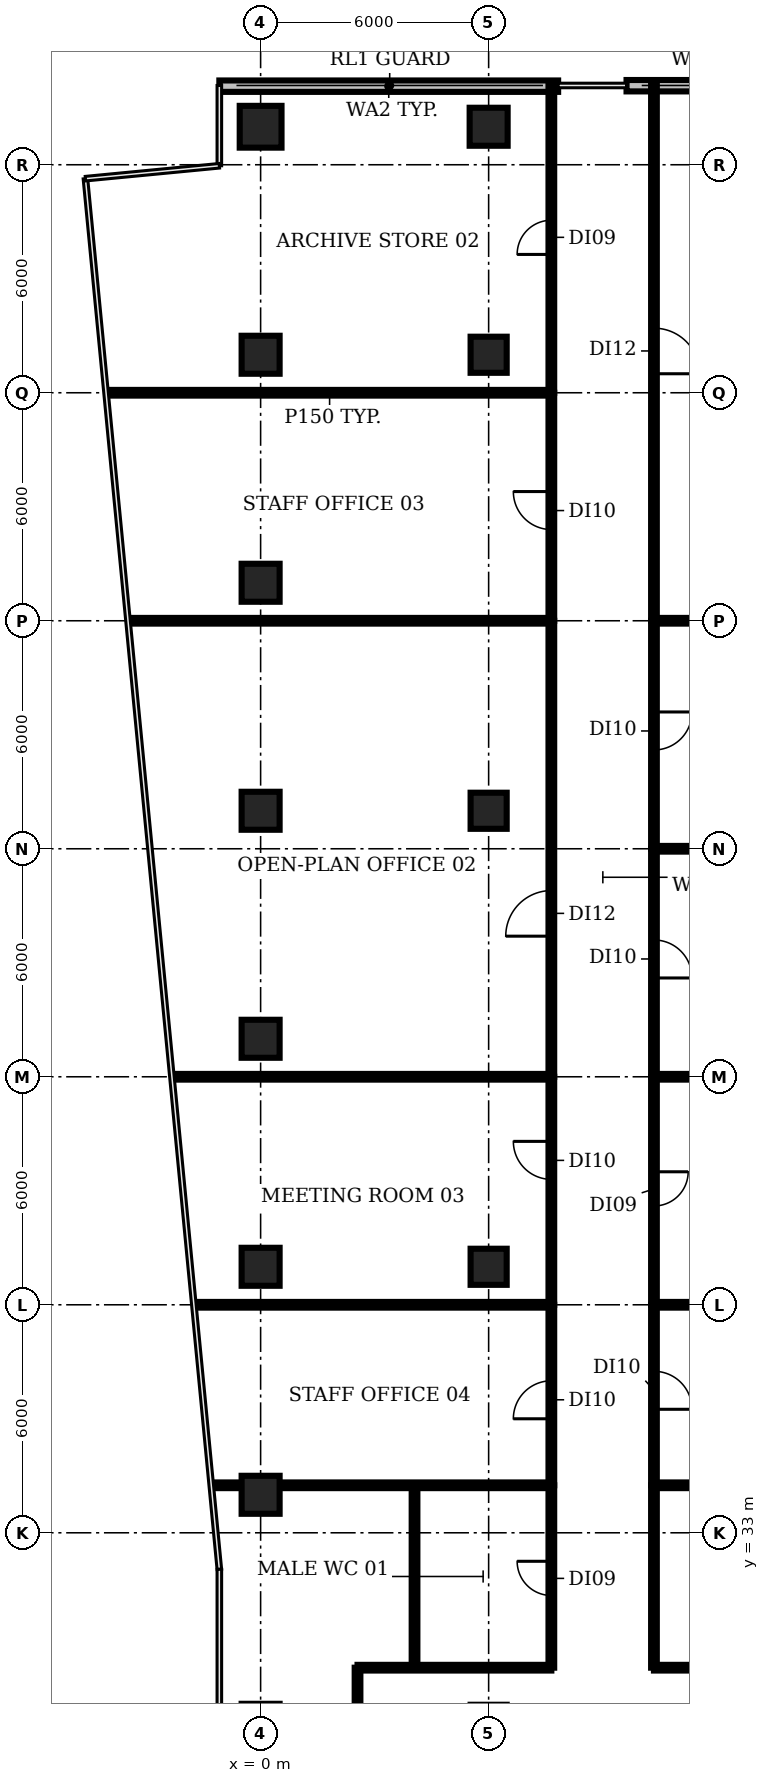
"""IFC4 building model, lengths in metres.
Left out: names, types, materials, properties, quantities, classifications, styles, units other than length and angle.
Written with IfcOpenShell. Run it as: python <this file> out.ifc"""

import sys

from ifc_helpers import new_model, si_unit, direction, frame, frame_2d, origin, origin_2d, place, context, subcontext, project, spatial, rectangle, circle, extrude, element, fill, save


model = new_model("IFC4")
c1 = context("Model", 3, precision=1e-05, world=origin(), true_north=direction((0.0, 1.0)))
c2 = subcontext(c1, "Body", "Model", "MODEL_VIEW")
j1 = project(units=[si_unit("LENGTHUNIT", "METRE"), si_unit("PLANEANGLEUNIT", "RADIAN")], contexts=[c1])
p1 = place(None, origin())
s1 = spatial("IfcSite", under=j1, at=p1, CompositionType="ELEMENT")
p2 = place(p1, origin())
s2 = spatial("IfcBuilding", under=s1, at=p2, CompositionType="ELEMENT")
p3 = place(p2, frame((0.0, 0.0, 87.8)))
s3 = spatial("IfcBuildingStorey", under=s2, at=p3, CompositionType="ELEMENT", Elevation=87.8)
for number, where, z_axis, x_axis in (
    (1, (0.0, 34.0, -0.35), (0.0, 0.0, 1.0), (1.0, 0.0, 0.0)),
    (2, (0.0, 40.0, -0.35), (0.0, 0.0, 1.0), (1.0, 0.0, 0.0)),
    (3, (0.0, 46.0, -0.35), (0.0, 0.0, 1.0), (1.0, 0.0, 0.0)),
    (4, (0.0, 52.0, -0.35), (0.0, 0.0, 1.0), (1.0, 0.0, 0.0)),
    (5, (0.0, 58.0, -0.35), (0.0, 0.0, 1.0), (1.0, 0.0, 0.0)),
    (6, (0.0, 64.0, -0.35), (0.0, 0.0, 1.0), (1.0, 0.0, 0.0)),
):
    element("IfcColumn", number, at=place(p3, frame(where, z_axis=z_axis, x_axis=x_axis)), inside=s3, PredefinedType="COLUMN", context=c2, shape_type="SweptSolid", body=[
        extrude(rectangle(XDim=1.0, YDim=1.0, at=origin_2d()), origin(), (0.0, 0.0, 1.0), 4.2),
    ])
p4 = place(p3, frame((0.0, 70.0, -0.35), z_axis=(0.0, 0.0, 1.0), x_axis=(1.0, 0.0, 0.0)))
e7 = element("IfcColumn", 7, at=p4, inside=s3, PredefinedType="COLUMN", context=c2, shape_type="SweptSolid", body=[
    extrude(circle(Radius=0.55, at=origin_2d()), origin(), (0.0, 0.0, 1.0), 4.2),
])
for number, where, z_axis, x_axis in (
    (8, (6.0, 40.0, -0.35), (0.0, 0.0, 1.0), (1.0, 0.0, 0.0)),
    (9, (6.0, 52.0, -0.35), (0.0, 0.0, 1.0), (1.0, 0.0, 0.0)),
    (10, (6.0, 64.0, -0.35), (0.0, 0.0, 1.0), (1.0, 0.0, 0.0)),
):
    element("IfcColumn", number, at=place(p3, frame(where, z_axis=z_axis, x_axis=x_axis)), inside=s3, PredefinedType="COLUMN", context=c2, shape_type="SweptSolid", body=[
        extrude(rectangle(XDim=0.95, YDim=0.95, at=origin_2d()), origin(), (0.0, 0.0, 1.0), 4.2),
    ])
p5 = place(p3, frame((6.0, 70.0, -0.35), z_axis=(0.0, 0.0, 1.0), x_axis=(1.0, 0.0, 0.0)))
e11 = element("IfcColumn", 11, at=p5, inside=s3, PredefinedType="COLUMN", context=c2, shape_type="SweptSolid", body=[
    extrude(rectangle(XDim=1.0, YDim=1.0, at=origin_2d()), origin(), (0.0, 0.0, 1.0), 4.2),
])
p6 = place(p3, frame((14.372, 71.08, 0.0), z_axis=(0.0, 0.0, 1.0), x_axis=(-1.0, 0.0, 0.0)))
e12 = element("IfcWall", 12, at=p6, inside=s3, PredefinedType="SOLIDWALL", context=c2, shape_type="SweptSolid", body=[
    extrude(rectangle(XDim=4.743, YDim=0.3, at=frame_2d((2.372, 0.0))), origin(), (0.0, 0.0, 1.0), 3.85),
])
p7 = place(p3, frame((7.829, 71.068, 0.0), z_axis=(0.0, 0.0, 1.0), x_axis=(-1.0, 0.0, 0.0)))
e13 = element("IfcWall", 13, at=p7, inside=s3, PredefinedType="SOLIDWALL", context=c2, shape_type="SweptSolid", body=[
    extrude(rectangle(XDim=8.915, YDim=0.3, at=frame_2d((4.457, 0.0))), origin(), (0.0, 0.0, 1.0), 3.85),
])
p8 = place(p3, frame((-4.02, 63.0, 0.0), z_axis=(0.0, 0.0, 1.0), x_axis=(1.0, 0.0, 0.0)))
e14 = element("IfcWall", 14, at=p8, inside=s3, PredefinedType="PARTITIONING", context=c2, shape_type="SweptSolid", body=[
    extrude(rectangle(XDim=11.67, YDim=0.15, at=frame_2d((5.835, 0.0))), origin(), (0.0, 0.0, 1.0), 2.83),
])
p9 = place(p3, frame((-3.44, 57.0, 0.0), z_axis=(0.0, 0.0, 1.0), x_axis=(1.0, 0.0, 0.0)))
e15 = element("IfcWall", 15, at=p9, inside=s3, PredefinedType="PARTITIONING", context=c2, shape_type="SweptSolid", body=[
    extrude(rectangle(XDim=11.09, YDim=0.15, at=frame_2d((5.545, 0.0))), origin(), (0.0, 0.0, 1.0), 2.83),
])
p10 = place(p3, frame((-2.28, 45.0, 0.0), z_axis=(0.0, 0.0, 1.0), x_axis=(1.0, 0.0, 0.0)))
e16 = element("IfcWall", 16, at=p10, inside=s3, PredefinedType="PARTITIONING", context=c2, shape_type="SweptSolid", body=[
    extrude(rectangle(XDim=9.93, YDim=0.15, at=frame_2d((4.965, 0.0))), origin(), (0.0, 0.0, 1.0), 2.83),
])
p11 = place(p3, frame((-1.71, 39.0, 0.0), z_axis=(0.0, 0.0, 1.0), x_axis=(1.0, 0.0, 0.0)))
e17 = element("IfcWall", 17, at=p11, inside=s3, PredefinedType="PARTITIONING", context=c2, shape_type="SweptSolid", body=[
    extrude(rectangle(XDim=9.36, YDim=0.15, at=frame_2d((4.68, 0.0))), origin(), (0.0, 0.0, 1.0), 2.83),
])
p12 = place(p3, frame((-1.25, 34.25, 0.0), z_axis=(0.0, 0.0, 1.0), x_axis=(1.0, 0.0, 0.0)))
e18 = element("IfcWall", 18, at=p12, inside=s3, PredefinedType="PARTITIONING", context=c2, shape_type="SweptSolid", body=[
    extrude(rectangle(XDim=8.9, YDim=0.15, at=frame_2d((4.45, 0.0))), origin(), (0.0, 0.0, 1.0), 2.83),
])
p13 = place(p3, frame((2.55, 25.55, 0.0), z_axis=(0.0, 0.0, 1.0), x_axis=(0.0, 1.0, 0.0)))
e19 = element("IfcWall", 19, at=p13, inside=s3, PredefinedType="PARTITIONING", context=c2, shape_type="SweptSolid", body=[
    extrude(rectangle(XDim=3.9, YDim=0.15, at=frame_2d((1.95, 0.0))), origin(), (0.0, 0.0, 1.0), 2.83),
])
p14 = place(p3, frame((2.55, 29.45, 0.0), z_axis=(0.0, 0.0, 1.0), x_axis=(1.0, 0.0, 0.0)))
e20 = element("IfcWall", 20, at=p14, inside=s3, PredefinedType="PARTITIONING", context=c2, shape_type="SweptSolid", body=[
    extrude(rectangle(XDim=5.1, YDim=0.15, at=frame_2d((2.55, 0.0))), origin(), (0.0, 0.0, 1.0), 2.83),
])
p15 = place(p3, frame((4.05, 29.45, 0.0), z_axis=(0.0, 0.0, 1.0), x_axis=(0.0, 1.0, 0.0)))
e21 = element("IfcWall", 21, at=p15, inside=s3, PredefinedType="PARTITIONING", context=c2, shape_type="SweptSolid", body=[
    extrude(rectangle(XDim=4.8, YDim=0.15, at=frame_2d((2.4, 0.0))), origin(), (0.0, 0.0, 1.0), 2.83),
])
p16 = place(p3, frame((7.65, 29.45, 0.0), z_axis=(0.0, 0.0, 1.0), x_axis=(0.0, 1.0, 0.0)))
e22 = element("IfcWall", 22, at=p16, inside=s3, PredefinedType="PARTITIONING", context=c2, shape_type="SweptSolid", body=[
    extrude(rectangle(XDim=4.8, YDim=0.15, at=frame_2d((2.4, 0.0))), origin(), (0.0, 0.0, 1.0), 2.83),
])
p17 = place(p16, frame((1.9, 0.0, 0.0)))
e23 = element("IfcOpeningElement", 23, at=p17, cuts=e22, PredefinedType="OPENING", context=c2, shape_type="SweptSolid", body=[
    extrude(rectangle(XDim=0.9, YDim=2.1, at=frame_2d((0.45, 1.05))), frame((0.0, 0.085, 0.0), z_axis=(0.0, -1.0, 0.0), x_axis=(1.0, 0.0, 0.0)), (0.0, 0.0, 1.0), 0.17),
])
p18 = place(p3, frame((7.65, 34.25, 0.0), z_axis=(0.0, 0.0, 1.0), x_axis=(0.0, 1.0, 0.0)))
e24 = element("IfcWall", 24, at=p18, inside=s3, PredefinedType="PARTITIONING", context=c2, shape_type="SweptSolid", body=[
    extrude(rectangle(XDim=4.75, YDim=0.15, at=frame_2d((2.375, 0.0))), origin(), (0.0, 0.0, 1.0), 2.83),
])
p19 = place(p18, frame((1.75, 0.0, 0.0)))
e25 = element("IfcOpeningElement", 25, at=p19, cuts=e24, PredefinedType="OPENING", context=c2, shape_type="SweptSolid", body=[
    extrude(rectangle(XDim=1.0, YDim=2.1, at=frame_2d((0.5, 1.05))), frame((0.0, 0.085, 0.0), z_axis=(0.0, -1.0, 0.0), x_axis=(1.0, 0.0, 0.0)), (0.0, 0.0, 1.0), 0.17),
])
p20 = place(p3, frame((7.65, 39.0, 0.0), z_axis=(0.0, 0.0, 1.0), x_axis=(0.0, 1.0, 0.0)))
e26 = element("IfcWall", 26, at=p20, inside=s3, PredefinedType="PARTITIONING", context=c2, shape_type="SweptSolid", body=[
    extrude(rectangle(XDim=6.0, YDim=0.15, at=frame_2d((3.0, 0.0))), origin(), (0.0, 0.0, 1.0), 2.83),
])
p21 = place(p20, frame((3.3, 0.0, 0.0)))
e27 = element("IfcOpeningElement", 27, at=p21, cuts=e26, PredefinedType="OPENING", context=c2, shape_type="SweptSolid", body=[
    extrude(rectangle(XDim=1.0, YDim=2.1, at=frame_2d((0.5, 1.05))), frame((0.0, 0.085, 0.0), z_axis=(0.0, -1.0, 0.0), x_axis=(1.0, 0.0, 0.0)), (0.0, 0.0, 1.0), 0.17),
])
p22 = place(p3, frame((7.65, 45.0, 0.0), z_axis=(0.0, 0.0, 1.0), x_axis=(0.0, 1.0, 0.0)))
e28 = element("IfcWall", 28, at=p22, inside=s3, PredefinedType="PARTITIONING", context=c2, shape_type="SweptSolid", body=[
    extrude(rectangle(XDim=12.0, YDim=0.15, at=frame_2d((6.0, 0.0))), origin(), (0.0, 0.0, 1.0), 2.83),
])
p23 = place(p22, frame((3.7, 0.0, 0.0)))
e29 = element("IfcOpeningElement", 29, at=p23, cuts=e28, PredefinedType="OPENING", context=c2, shape_type="SweptSolid", body=[
    extrude(rectangle(XDim=1.2, YDim=2.1, at=frame_2d((0.6, 1.05))), frame((0.0, 0.085, 0.0), z_axis=(0.0, -1.0, 0.0), x_axis=(1.0, 0.0, 0.0)), (0.0, 0.0, 1.0), 0.17),
])
p24 = place(p3, frame((7.65, 57.0, 0.0), z_axis=(0.0, 0.0, 1.0), x_axis=(0.0, 1.0, 0.0)))
e30 = element("IfcWall", 30, at=p24, inside=s3, PredefinedType="PARTITIONING", context=c2, shape_type="SweptSolid", body=[
    extrude(rectangle(XDim=6.0, YDim=0.15, at=frame_2d((3.0, 0.0))), origin(), (0.0, 0.0, 1.0), 2.83),
])
p25 = place(p24, frame((2.4, 0.0, 0.0)))
e31 = element("IfcOpeningElement", 31, at=p25, cuts=e30, PredefinedType="OPENING", context=c2, shape_type="SweptSolid", body=[
    extrude(rectangle(XDim=1.0, YDim=2.1, at=frame_2d((0.5, 1.05))), frame((0.0, 0.085, 0.0), z_axis=(0.0, -1.0, 0.0), x_axis=(1.0, 0.0, 0.0)), (0.0, 0.0, 1.0), 0.17),
])
p26 = place(p3, frame((7.65, 63.0, 0.0), z_axis=(0.0, 0.0, 1.0), x_axis=(0.0, 1.0, 0.0)))
e32 = element("IfcWall", 32, at=p26, inside=s3, PredefinedType="PARTITIONING", context=c2, shape_type="SweptSolid", body=[
    extrude(rectangle(XDim=8.146, YDim=0.15, at=frame_2d((4.073, 0.0))), origin(), (0.0, 0.0, 1.0), 2.83),
])
p27 = place(p26, frame((3.64, 0.0, 0.0)))
e33 = element("IfcOpeningElement", 33, at=p27, cuts=e32, PredefinedType="OPENING", context=c2, shape_type="SweptSolid", body=[
    extrude(rectangle(XDim=0.9, YDim=2.1, at=frame_2d((0.45, 1.05))), frame((0.0, 0.085, 0.0), z_axis=(0.0, -1.0, 0.0), x_axis=(1.0, 0.0, 0.0)), (0.0, 0.0, 1.0), 0.17),
])
p28 = place(p3, frame((10.35, 29.45, 0.0), z_axis=(0.0, 0.0, 1.0), x_axis=(0.0, 1.0, 0.0)))
e34 = element("IfcWall", 34, at=p28, inside=s3, PredefinedType="PARTITIONING", context=c2, shape_type="SweptSolid", body=[
    extrude(rectangle(XDim=4.8, YDim=0.15, at=frame_2d((2.4, 0.0))), origin(), (0.0, 0.0, 1.0), 2.83),
])
p29 = place(p3, frame((10.35, 29.45, 0.0), z_axis=(0.0, 0.0, 1.0), x_axis=(1.0, 0.0, 0.0)))
e35 = element("IfcWall", 35, at=p29, inside=s3, PredefinedType="PARTITIONING", context=c2, shape_type="SweptSolid", body=[
    extrude(rectangle(XDim=4.05, YDim=0.15, at=frame_2d((2.025, 0.0))), origin(), (0.0, 0.0, 1.0), 2.83),
])
p30 = place(p3, frame((10.35, 34.25, 0.0), z_axis=(0.0, 0.0, 1.0), x_axis=(1.0, 0.0, 0.0)))
e36 = element("IfcWall", 36, at=p30, inside=s3, PredefinedType="PARTITIONING", context=c2, shape_type="SweptSolid", body=[
    extrude(rectangle(XDim=15.04, YDim=0.15, at=frame_2d((7.52, 0.0))), origin(), (0.0, 0.0, 1.0), 2.83),
])
p31 = place(p3, frame((10.35, 39.0, 0.0), z_axis=(0.0, 0.0, 1.0), x_axis=(0.0, -1.0, 0.0)))
e37 = element("IfcWall", 37, at=p31, inside=s3, PredefinedType="PARTITIONING", context=c2, shape_type="SweptSolid", body=[
    extrude(rectangle(XDim=4.75, YDim=0.15, at=frame_2d((2.375, 0.0))), origin(), (0.0, 0.0, 1.0), 2.83),
])
p32 = place(p31, frame((1.75, 0.0, 0.0)))
e38 = element("IfcOpeningElement", 38, at=p32, cuts=e37, PredefinedType="OPENING", context=c2, shape_type="SweptSolid", body=[
    extrude(rectangle(XDim=1.0, YDim=2.1, at=frame_2d((0.5, 1.05))), frame((0.0, 0.085, 0.0), z_axis=(0.0, -1.0, 0.0), x_axis=(1.0, 0.0, 0.0)), (0.0, 0.0, 1.0), 0.17),
])
p33 = place(p3, frame((10.35, 39.0, 0.0), z_axis=(0.0, 0.0, 1.0), x_axis=(1.0, 0.0, 0.0)))
e39 = element("IfcWall", 39, at=p33, inside=s3, PredefinedType="PARTITIONING", context=c2, shape_type="SweptSolid", body=[
    extrude(rectangle(XDim=14.69, YDim=0.15, at=frame_2d((7.345, 0.0))), origin(), (0.0, 0.0, 1.0), 2.83),
])
p34 = place(p3, frame((10.35, 45.0, 0.0), z_axis=(0.0, 0.0, 1.0), x_axis=(0.0, -1.0, 0.0)))
e40 = element("IfcWall", 40, at=p34, inside=s3, PredefinedType="PARTITIONING", context=c2, shape_type="SweptSolid", body=[
    extrude(rectangle(XDim=6.0, YDim=0.15, at=frame_2d((3.0, 0.0))), origin(), (0.0, 0.0, 1.0), 2.83),
])
p35 = place(p34, frame((2.5, 0.0, 0.0)))
e41 = element("IfcOpeningElement", 41, at=p35, cuts=e40, PredefinedType="OPENING", context=c2, shape_type="SweptSolid", body=[
    extrude(rectangle(XDim=0.9, YDim=2.1, at=frame_2d((0.45, 1.05))), frame((0.0, 0.085, 0.0), z_axis=(0.0, -1.0, 0.0), x_axis=(1.0, 0.0, 0.0)), (0.0, 0.0, 1.0), 0.17),
])
p36 = place(p3, frame((10.35, 45.0, 0.0), z_axis=(0.0, 0.0, 1.0), x_axis=(1.0, 0.0, 0.0)))
e42 = element("IfcWall", 42, at=p36, inside=s3, PredefinedType="PARTITIONING", context=c2, shape_type="SweptSolid", body=[
    extrude(rectangle(XDim=14.69, YDim=0.15, at=frame_2d((7.345, 0.0))), origin(), (0.0, 0.0, 1.0), 2.83),
])
p37 = place(p3, frame((10.35, 51.0, 0.0), z_axis=(0.0, 0.0, 1.0), x_axis=(0.0, -1.0, 0.0)))
e43 = element("IfcWall", 43, at=p37, inside=s3, PredefinedType="PARTITIONING", context=c2, shape_type="SweptSolid", body=[
    extrude(rectangle(XDim=6.0, YDim=0.15, at=frame_2d((3.0, 0.0))), origin(), (0.0, 0.0, 1.0), 2.83),
])
p38 = place(p37, frame((2.4, 0.0, 0.0)))
e44 = element("IfcOpeningElement", 44, at=p38, cuts=e43, PredefinedType="OPENING", context=c2, shape_type="SweptSolid", body=[
    extrude(rectangle(XDim=1.0, YDim=2.1, at=frame_2d((0.5, 1.05))), frame((0.0, 0.085, 0.0), z_axis=(0.0, -1.0, 0.0), x_axis=(1.0, 0.0, 0.0)), (0.0, 0.0, 1.0), 0.17),
])
p39 = place(p3, frame((10.35, 51.0, 0.0), z_axis=(0.0, 0.0, 1.0), x_axis=(1.0, 0.0, 0.0)))
e45 = element("IfcWall", 45, at=p39, inside=s3, PredefinedType="PARTITIONING", context=c2, shape_type="SweptSolid", body=[
    extrude(rectangle(XDim=14.69, YDim=0.15, at=frame_2d((7.345, 0.0))), origin(), (0.0, 0.0, 1.0), 2.83),
])
p40 = place(p3, frame((10.35, 57.0, 0.0), z_axis=(0.0, 0.0, 1.0), x_axis=(0.0, -1.0, 0.0)))
e46 = element("IfcWall", 46, at=p40, inside=s3, PredefinedType="PARTITIONING", context=c2, shape_type="SweptSolid", body=[
    extrude(rectangle(XDim=6.0, YDim=0.15, at=frame_2d((3.0, 0.0))), origin(), (0.0, 0.0, 1.0), 2.83),
])
p41 = place(p40, frame((2.4, 0.0, 0.0)))
e47 = element("IfcOpeningElement", 47, at=p41, cuts=e46, PredefinedType="OPENING", context=c2, shape_type="SweptSolid", body=[
    extrude(rectangle(XDim=1.0, YDim=2.1, at=frame_2d((0.5, 1.05))), frame((0.0, 0.085, 0.0), z_axis=(0.0, -1.0, 0.0), x_axis=(1.0, 0.0, 0.0)), (0.0, 0.0, 1.0), 0.17),
])
p42 = place(p3, frame((10.35, 57.0, 0.0), z_axis=(0.0, 0.0, 1.0), x_axis=(1.0, 0.0, 0.0)))
e48 = element("IfcWall", 48, at=p42, inside=s3, PredefinedType="PARTITIONING", context=c2, shape_type="SweptSolid", body=[
    extrude(rectangle(XDim=14.69, YDim=0.15, at=frame_2d((7.345, 0.0))), origin(), (0.0, 0.0, 1.0), 2.83),
])
p43 = place(p3, frame((10.35, 71.146, 0.0), z_axis=(0.0, 0.0, 1.0), x_axis=(0.0, -1.0, 0.0)))
e49 = element("IfcWall", 49, at=p43, inside=s3, PredefinedType="PARTITIONING", context=c2, shape_type="SweptSolid", body=[
    extrude(rectangle(XDim=14.146, YDim=0.15, at=frame_2d((7.073, 0.0))), origin(), (0.0, 0.0, 1.0), 2.83),
])
p44 = place(p43, frame((6.446, 0.0, 0.0)))
e50 = element("IfcOpeningElement", 50, at=p44, cuts=e49, PredefinedType="OPENING", context=c2, shape_type="SweptSolid", body=[
    extrude(rectangle(XDim=1.2, YDim=2.1, at=frame_2d((0.6, 1.05))), frame((0.0, 0.085, 0.0), z_axis=(0.0, -1.0, 0.0), x_axis=(1.0, 0.0, 0.0)), (0.0, 0.0, 1.0), 0.17),
])
p45 = place(p17, origin())
e51 = element("IfcDoor", 51, at=p45, inside=s3, OperationType="SINGLE_SWING_RIGHT", PredefinedType="DOOR", context=c2, shape_type="SweptSolid", body=[
    extrude(rectangle(XDim=0.9, YDim=2.1, at=frame_2d((0.45, 1.05))), frame((0.0, 0.025, 0.0), z_axis=(0.0, -1.0, 0.0), x_axis=(1.0, 0.0, 0.0)), (0.0, 0.0, 1.0), 0.05),
])
fill(e23, e51)
p46 = place(p19, origin())
e52 = element("IfcDoor", 52, at=p46, inside=s3, OperationType="SINGLE_SWING_LEFT", PredefinedType="DOOR", context=c2, shape_type="SweptSolid", body=[
    extrude(rectangle(XDim=1.0, YDim=2.1, at=frame_2d((0.5, 1.05))), frame((0.0, 0.025, 0.0), z_axis=(0.0, -1.0, 0.0), x_axis=(1.0, 0.0, 0.0)), (0.0, 0.0, 1.0), 0.05),
])
fill(e25, e52)
p47 = place(p21, origin())
e53 = element("IfcDoor", 53, at=p47, inside=s3, OperationType="SINGLE_SWING_RIGHT", PredefinedType="DOOR", context=c2, shape_type="SweptSolid", body=[
    extrude(rectangle(XDim=1.0, YDim=2.1, at=frame_2d((0.5, 1.05))), frame((0.0, 0.025, 0.0), z_axis=(0.0, -1.0, 0.0), x_axis=(1.0, 0.0, 0.0)), (0.0, 0.0, 1.0), 0.05),
])
fill(e27, e53)
p48 = place(p23, origin())
e54 = element("IfcDoor", 54, at=p48, inside=s3, OperationType="SINGLE_SWING_LEFT", PredefinedType="DOOR", context=c2, shape_type="SweptSolid", body=[
    extrude(rectangle(XDim=1.2, YDim=2.1, at=frame_2d((0.6, 1.05))), frame((0.0, 0.025, 0.0), z_axis=(0.0, -1.0, 0.0), x_axis=(1.0, 0.0, 0.0)), (0.0, 0.0, 1.0), 0.05),
])
fill(e29, e54)
p49 = place(p25, origin())
e55 = element("IfcDoor", 55, at=p49, inside=s3, OperationType="SINGLE_SWING_RIGHT", PredefinedType="DOOR", context=c2, shape_type="SweptSolid", body=[
    extrude(rectangle(XDim=1.0, YDim=2.1, at=frame_2d((0.5, 1.05))), frame((0.0, 0.025, 0.0), z_axis=(0.0, -1.0, 0.0), x_axis=(1.0, 0.0, 0.0)), (0.0, 0.0, 1.0), 0.05),
])
fill(e31, e55)
p50 = place(p27, origin())
e56 = element("IfcDoor", 56, at=p50, inside=s3, OperationType="SINGLE_SWING_LEFT", PredefinedType="DOOR", context=c2, shape_type="SweptSolid", body=[
    extrude(rectangle(XDim=0.9, YDim=2.1, at=frame_2d((0.45, 1.05))), frame((0.0, 0.025, 0.0), z_axis=(0.0, -1.0, 0.0), x_axis=(1.0, 0.0, 0.0)), (0.0, 0.0, 1.0), 0.05),
])
fill(e33, e56)
p51 = place(p32, origin())
e57 = element("IfcDoor", 57, at=p51, inside=s3, OperationType="SINGLE_SWING_RIGHT", PredefinedType="DOOR", context=c2, shape_type="SweptSolid", body=[
    extrude(rectangle(XDim=1.0, YDim=2.1, at=frame_2d((0.5, 1.05))), frame((0.0, 0.025, 0.0), z_axis=(0.0, -1.0, 0.0), x_axis=(1.0, 0.0, 0.0)), (0.0, 0.0, 1.0), 0.05),
])
fill(e38, e57)
p52 = place(p35, origin())
e58 = element("IfcDoor", 58, at=p52, inside=s3, OperationType="SINGLE_SWING_LEFT", PredefinedType="DOOR", context=c2, shape_type="SweptSolid", body=[
    extrude(rectangle(XDim=0.9, YDim=2.1, at=frame_2d((0.45, 1.05))), frame((0.0, 0.025, 0.0), z_axis=(0.0, -1.0, 0.0), x_axis=(1.0, 0.0, 0.0)), (0.0, 0.0, 1.0), 0.05),
])
fill(e41, e58)
p53 = place(p38, origin())
e59 = element("IfcDoor", 59, at=p53, inside=s3, OperationType="SINGLE_SWING_RIGHT", PredefinedType="DOOR", context=c2, shape_type="SweptSolid", body=[
    extrude(rectangle(XDim=1.0, YDim=2.1, at=frame_2d((0.5, 1.05))), frame((0.0, 0.025, 0.0), z_axis=(0.0, -1.0, 0.0), x_axis=(1.0, 0.0, 0.0)), (0.0, 0.0, 1.0), 0.05),
])
fill(e44, e59)
p54 = place(p41, origin())
e60 = element("IfcDoor", 60, at=p54, inside=s3, OperationType="SINGLE_SWING_LEFT", PredefinedType="DOOR", context=c2, shape_type="SweptSolid", body=[
    extrude(rectangle(XDim=1.0, YDim=2.1, at=frame_2d((0.5, 1.05))), frame((0.0, 0.025, 0.0), z_axis=(0.0, -1.0, 0.0), x_axis=(1.0, 0.0, 0.0)), (0.0, 0.0, 1.0), 0.05),
])
fill(e47, e60)
p55 = place(p44, origin())
e61 = element("IfcDoor", 61, at=p55, inside=s3, OperationType="SINGLE_SWING_RIGHT", PredefinedType="DOOR", context=c2, shape_type="SweptSolid", body=[
    extrude(rectangle(XDim=1.2, YDim=2.1, at=frame_2d((0.6, 1.05))), frame((0.0, 0.025, 0.0), z_axis=(0.0, -1.0, 0.0), x_axis=(1.0, 0.0, 0.0)), (0.0, 0.0, 1.0), 0.05),
])
fill(e50, e61)
save(model, sys.argv[1])
